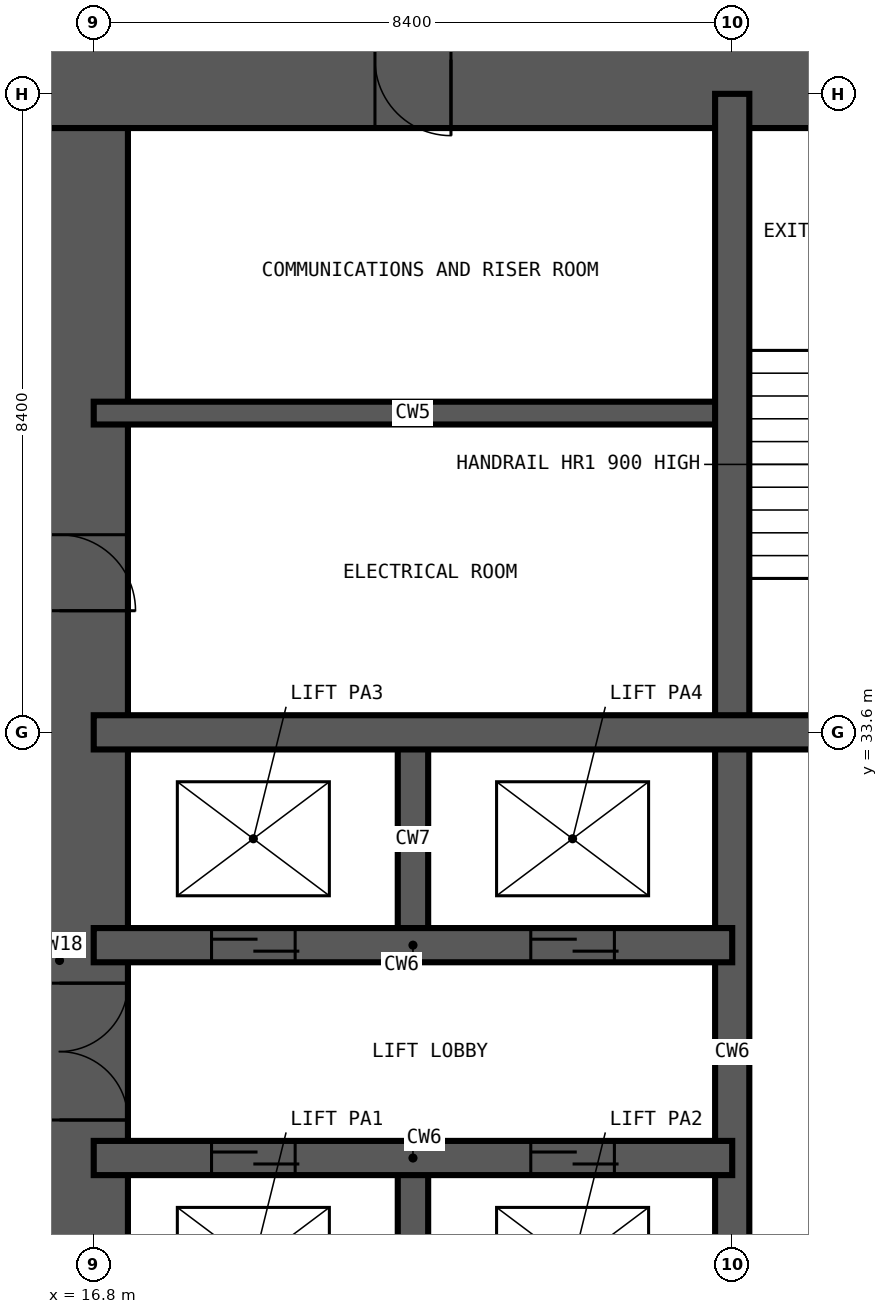
"""IFC4 building model, lengths in metres.
Left out: names, types, materials, properties, quantities, classifications, styles, units other than length and angle.
Written with IfcOpenShell. Run it as: python <this file> out.ifc"""

import sys

from ifc_helpers import new_model, si_unit, direction, frame, frame_2d, origin, place, context, subcontext, project, spatial, rectangle, extrude, element, fill, save


model = new_model("IFC4")
c1 = context("Model", 3, precision=1e-05, world=origin(), true_north=direction((0.0, 1.0)))
c2 = subcontext(c1, "Body", "Model", "MODEL_VIEW")
j1 = project(units=[si_unit("LENGTHUNIT", "METRE"), si_unit("PLANEANGLEUNIT", "RADIAN")], contexts=[c1])
p1 = place(None, origin())
s1 = spatial("IfcSite", under=j1, at=p1, CompositionType="ELEMENT")
p2 = place(p1, origin())
s2 = spatial("IfcBuilding", under=s1, at=p2, CompositionType="ELEMENT")
p3 = place(p2, frame((0.0, 0.0, 45.0)))
s3 = spatial("IfcBuildingStorey", under=s2, at=p3, CompositionType="ELEMENT", Elevation=45.0)
p4 = place(p3, frame((43.35, 42.45, -0.35), z_axis=(0.0, 0.0, 1.0), x_axis=(-1.0, 0.0, 0.0)))
e1 = element("IfcWall", 1, at=p4, inside=s3, PredefinedType="SHEAR", context=c2, shape_type="SweptSolid", body=[
    extrude(rectangle(XDim=27.9, YDim=1.8, at=frame_2d((13.95, 0.0))), origin(), (0.0, 0.0, 1.0), 3.6),
])
p5 = place(p4, frame((21.85, 0.0, 0.35)))
e2 = element("IfcOpeningElement", 2, at=p5, cuts=e1, PredefinedType="OPENING", context=c2, shape_type="SweptSolid", body=[
    extrude(rectangle(XDim=1.0, YDim=2.1, at=frame_2d((0.5, 1.05))), frame((0.0, 0.91, 0.0), z_axis=(0.0, -1.0, 0.0), x_axis=(1.0, 0.0, 0.0)), (0.0, 0.0, 1.0), 1.82),
])
p6 = place(p4, frame((11.25, 0.0, 0.35)))
e3 = element("IfcOpeningElement", 3, at=p6, cuts=e1, PredefinedType="OPENING", context=c2, shape_type="SweptSolid", body=[
    extrude(rectangle(XDim=1.2, YDim=2.2, at=frame_2d((0.6, 1.1))), frame((0.0, 0.91, 0.0), z_axis=(0.0, -1.0, 0.0), x_axis=(1.0, 0.0, 0.0)), (0.0, 0.0, 1.0), 1.82),
])
p7 = place(p3, frame((16.35, 41.55, -0.35), z_axis=(0.0, 0.0, 1.0), x_axis=(0.0, -1.0, 0.0)))
e4 = element("IfcWall", 4, at=p7, inside=s3, PredefinedType="SHEAR", context=c2, shape_type="SweptSolid", body=[
    extrude(rectangle(XDim=24.3, YDim=1.8, at=frame_2d((12.15, 0.0))), origin(), (0.0, 0.0, 1.0), 3.6),
])
p8 = place(p7, frame((11.25, 0.0, 0.35)))
e5 = element("IfcOpeningElement", 5, at=p8, cuts=e4, PredefinedType="OPENING", context=c2, shape_type="SweptSolid", body=[
    extrude(rectangle(XDim=1.8, YDim=2.2, at=frame_2d((0.9, 1.1))), frame((0.0, 0.91, 0.0), z_axis=(0.0, -1.0, 0.0), x_axis=(1.0, 0.0, 0.0)), (0.0, 0.0, 1.0), 1.82),
])
p9 = place(p7, frame((20.05, 0.0, 0.35)))
e6 = element("IfcOpeningElement", 6, at=p9, cuts=e4, PredefinedType="OPENING", context=c2, shape_type="SweptSolid", body=[
    extrude(rectangle(XDim=1.0, YDim=2.1, at=frame_2d((0.5, 1.05))), frame((0.0, 0.91, 0.0), z_axis=(0.0, -1.0, 0.0), x_axis=(1.0, 0.0, 0.0)), (0.0, 0.0, 1.0), 1.82),
])
p10 = place(p7, frame((5.35, 0.0, 0.35)))
e7 = element("IfcOpeningElement", 7, at=p10, cuts=e4, PredefinedType="OPENING", context=c2, shape_type="SweptSolid", body=[
    extrude(rectangle(XDim=1.0, YDim=2.1, at=frame_2d((0.5, 1.05))), frame((0.0, 0.91, 0.0), z_axis=(0.0, -1.0, 0.0), x_axis=(1.0, 0.0, 0.0)), (0.0, 0.0, 1.0), 1.82),
])
p11 = place(p3, frame((16.8, 37.8, -0.35), z_axis=(0.0, 0.0, 1.0), x_axis=(1.0, 0.0, 0.0)))
e8 = element("IfcWall", 8, at=p11, inside=s3, PredefinedType="SHEAR", context=c2, shape_type="SweptSolid", body=[
    extrude(rectangle(XDim=8.4, YDim=0.3, at=frame_2d((4.2, 0.0))), origin(), (0.0, 0.0, 1.0), 3.6),
])
for number, where, z_axis, x_axis in (
    (9, (21.0, 25.2, -0.35), (0.0, 0.0, 1.0), (0.0, 1.0, 0.0)),
    (10, (21.0, 30.8, -0.35), (0.0, 0.0, 1.0), (0.0, 1.0, 0.0)),
):
    element("IfcWall", number, at=place(p3, frame(where, z_axis=z_axis, x_axis=x_axis)), inside=s3, PredefinedType="SHEAR", context=c2, shape_type="SweptSolid", body=[
        extrude(rectangle(XDim=2.8, YDim=0.4, at=frame_2d((1.4, 0.0))), origin(), (0.0, 0.0, 1.0), 3.6),
    ])
p12 = place(p3, frame((25.2, 16.8, -0.35), z_axis=(0.0, 0.0, 1.0), x_axis=(0.0, 1.0, 0.0)))
e11 = element("IfcWall", 11, at=p12, inside=s3, PredefinedType="SHEAR", context=c2, shape_type="SweptSolid", body=[
    extrude(rectangle(XDim=25.2, YDim=0.45, at=frame_2d((12.6, 0.0))), origin(), (0.0, 0.0, 1.0), 3.6),
])
p13 = place(p3, frame((16.8, 28.0, -0.35), z_axis=(0.0, 0.0, 1.0), x_axis=(1.0, 0.0, 0.0)))
e12 = element("IfcWall", 12, at=p13, inside=s3, PredefinedType="SHEAR", context=c2, shape_type="SweptSolid", body=[
    extrude(rectangle(XDim=8.4, YDim=0.45, at=frame_2d((4.2, 0.0))), origin(), (0.0, 0.0, 1.0), 3.6),
])
p14 = place(p13, frame((1.55, 0.0, 0.35)))
e13 = element("IfcOpeningElement", 13, at=p14, cuts=e12, PredefinedType="OPENING", context=c2, shape_type="SweptSolid", body=[
    extrude(rectangle(XDim=1.1, YDim=2.2, at=frame_2d((0.55, 1.1))), frame((0.0, 0.235, 0.0), z_axis=(0.0, -1.0, 0.0), x_axis=(1.0, 0.0, 0.0)), (0.0, 0.0, 1.0), 0.47),
])
p15 = place(p13, frame((5.75, 0.0, 0.35)))
e14 = element("IfcOpeningElement", 14, at=p15, cuts=e12, PredefinedType="OPENING", context=c2, shape_type="SweptSolid", body=[
    extrude(rectangle(XDim=1.1, YDim=2.2, at=frame_2d((0.55, 1.1))), frame((0.0, 0.235, 0.0), z_axis=(0.0, -1.0, 0.0), x_axis=(1.0, 0.0, 0.0)), (0.0, 0.0, 1.0), 0.47),
])
p16 = place(p3, frame((16.8, 30.8, -0.35), z_axis=(0.0, 0.0, 1.0), x_axis=(1.0, 0.0, 0.0)))
e15 = element("IfcWall", 15, at=p16, inside=s3, PredefinedType="SHEAR", context=c2, shape_type="SweptSolid", body=[
    extrude(rectangle(XDim=8.4, YDim=0.45, at=frame_2d((4.2, 0.0))), origin(), (0.0, 0.0, 1.0), 3.6),
])
p17 = place(p16, frame((1.55, 0.0, 0.35)))
e16 = element("IfcOpeningElement", 16, at=p17, cuts=e15, PredefinedType="OPENING", context=c2, shape_type="SweptSolid", body=[
    extrude(rectangle(XDim=1.1, YDim=2.2, at=frame_2d((0.55, 1.1))), frame((0.0, 0.235, 0.0), z_axis=(0.0, -1.0, 0.0), x_axis=(1.0, 0.0, 0.0)), (0.0, 0.0, 1.0), 0.47),
])
p18 = place(p16, frame((5.75, 0.0, 0.35)))
e17 = element("IfcOpeningElement", 17, at=p18, cuts=e15, PredefinedType="OPENING", context=c2, shape_type="SweptSolid", body=[
    extrude(rectangle(XDim=1.1, YDim=2.2, at=frame_2d((0.55, 1.1))), frame((0.0, 0.235, 0.0), z_axis=(0.0, -1.0, 0.0), x_axis=(1.0, 0.0, 0.0)), (0.0, 0.0, 1.0), 0.47),
])
p19 = place(p3, frame((16.8, 33.6, -0.35), z_axis=(0.0, 0.0, 1.0), x_axis=(1.0, 0.0, 0.0)))
e18 = element("IfcWall", 18, at=p19, inside=s3, PredefinedType="SHEAR", context=c2, shape_type="SweptSolid", body=[
    extrude(rectangle(XDim=25.2, YDim=0.45, at=frame_2d((12.6, 0.0))), origin(), (0.0, 0.0, 1.0), 3.6),
])
p20 = place(p14, origin())
e19 = element("IfcDoor", 19, at=p20, inside=s3, OperationType="DOUBLE_DOOR_SLIDING", PredefinedType="DOOR", context=c2, shape_type="SweptSolid", body=[
    extrude(rectangle(XDim=1.1, YDim=2.2, at=frame_2d((0.55, 1.1))), frame((0.0, 0.025, 0.0), z_axis=(0.0, -1.0, 0.0), x_axis=(1.0, 0.0, 0.0)), (0.0, 0.0, 1.0), 0.05),
])
fill(e13, e19)
p21 = place(p15, origin())
e20 = element("IfcDoor", 20, at=p21, inside=s3, OperationType="DOUBLE_DOOR_SLIDING", PredefinedType="DOOR", context=c2, shape_type="SweptSolid", body=[
    extrude(rectangle(XDim=1.1, YDim=2.2, at=frame_2d((0.55, 1.1))), frame((0.0, 0.025, 0.0), z_axis=(0.0, -1.0, 0.0), x_axis=(1.0, 0.0, 0.0)), (0.0, 0.0, 1.0), 0.05),
])
fill(e14, e20)
p22 = place(p17, origin())
e21 = element("IfcDoor", 21, at=p22, inside=s3, OperationType="DOUBLE_DOOR_SLIDING", PredefinedType="DOOR", context=c2, shape_type="SweptSolid", body=[
    extrude(rectangle(XDim=1.1, YDim=2.2, at=frame_2d((0.55, 1.1))), frame((0.0, 0.025, 0.0), z_axis=(0.0, -1.0, 0.0), x_axis=(1.0, 0.0, 0.0)), (0.0, 0.0, 1.0), 0.05),
])
fill(e16, e21)
p23 = place(p18, origin())
e22 = element("IfcDoor", 22, at=p23, inside=s3, OperationType="DOUBLE_DOOR_SLIDING", PredefinedType="DOOR", context=c2, shape_type="SweptSolid", body=[
    extrude(rectangle(XDim=1.1, YDim=2.2, at=frame_2d((0.55, 1.1))), frame((0.0, 0.025, 0.0), z_axis=(0.0, -1.0, 0.0), x_axis=(1.0, 0.0, 0.0)), (0.0, 0.0, 1.0), 0.05),
])
fill(e17, e22)
p24 = place(p8, origin())
e23 = element("IfcDoor", 23, at=p24, inside=s3, OperationType="DOUBLE_DOOR_DOUBLE_SWING", PredefinedType="DOOR", context=c2, shape_type="SweptSolid", body=[
    extrude(rectangle(XDim=1.8, YDim=2.2, at=frame_2d((0.9, 1.1))), frame((0.0, 0.025, 0.0), z_axis=(0.0, -1.0, 0.0), x_axis=(1.0, 0.0, 0.0)), (0.0, 0.0, 1.0), 0.05),
])
fill(e5, e23)
p25 = place(p10, origin())
e24 = element("IfcDoor", 24, at=p25, inside=s3, OperationType="SINGLE_SWING_RIGHT", PredefinedType="DOOR", context=c2, shape_type="SweptSolid", body=[
    extrude(rectangle(XDim=1.0, YDim=2.1, at=frame_2d((0.5, 1.05))), frame((0.0, 0.025, 0.0), z_axis=(0.0, -1.0, 0.0), x_axis=(1.0, 0.0, 0.0)), (0.0, 0.0, 1.0), 0.05),
])
fill(e7, e24)
p26 = place(p5, origin())
e25 = element("IfcDoor", 25, at=p26, inside=s3, OperationType="SINGLE_SWING_LEFT", PredefinedType="DOOR", context=c2, shape_type="SweptSolid", body=[
    extrude(rectangle(XDim=1.0, YDim=2.1, at=frame_2d((0.5, 1.05))), frame((0.0, 0.025, 0.0), z_axis=(0.0, -1.0, 0.0), x_axis=(1.0, 0.0, 0.0)), (0.0, 0.0, 1.0), 0.05),
])
fill(e2, e25)
save(model, sys.argv[1])
